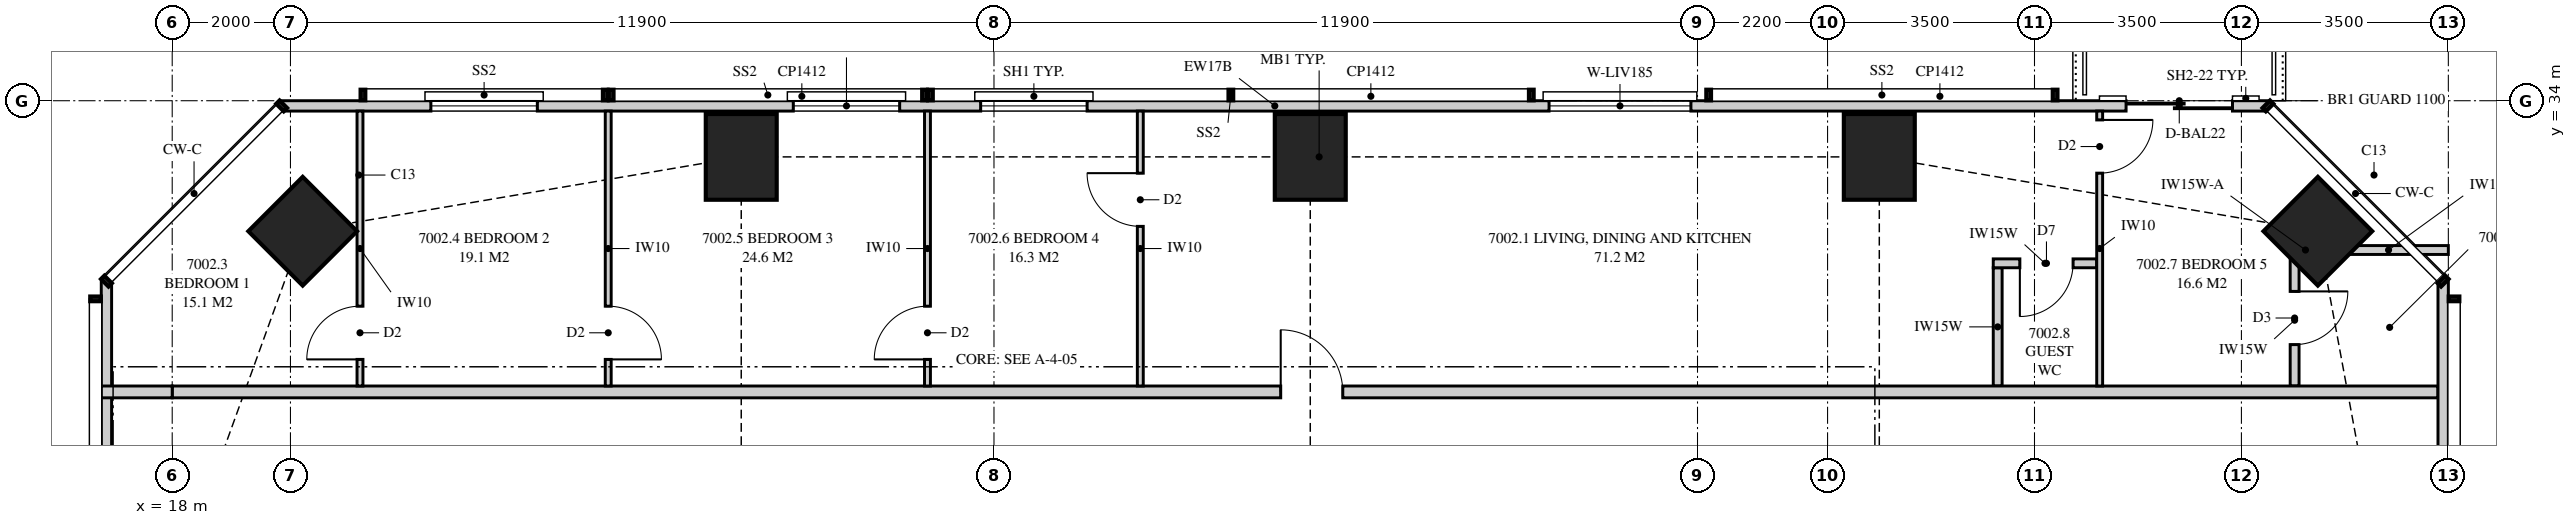
"""IFC4 building model, lengths in metres.
Left out: names, types, materials, properties, quantities, classifications, styles, units other than length and angle.
Written with IfcOpenShell. Run it as: python <this file> out.ifc"""

import sys

from ifc_helpers import new_model, si_unit, direction, frame, frame_2d, origin, origin_2d, place, context, subcontext, project, spatial, polyline, rectangle, outline, extrude, element, fill, save


model = new_model("IFC4")
c1 = context("Model", 3, precision=1e-05, world=origin(), true_north=direction((0.0, 1.0)))
c2 = subcontext(c1, "Body", "Model", "MODEL_VIEW")
j1 = project(units=[si_unit("LENGTHUNIT", "METRE"), si_unit("PLANEANGLEUNIT", "RADIAN")], contexts=[c1])
p1 = place(None, origin())
s1 = spatial("IfcSite", under=j1, at=p1, CompositionType="ELEMENT")
p2 = place(p1, origin())
s2 = spatial("IfcBuilding", under=s1, at=p2, CompositionType="ELEMENT")
p3 = place(p2, frame((0.0, 0.0, 256.45)))
s3 = spatial("IfcBuildingStorey", under=s2, at=p3, CompositionType="ELEMENT", Elevation=256.45)
p4 = place(p3, frame((54.293, 31.793, 0.0), z_axis=(0.0, 0.0, 1.0), x_axis=(0.707106781187, 0.707106781187, 0.0)))
e1 = element("IfcColumn", 1, at=p4, inside=s3, PredefinedType="COLUMN", context=c2, shape_type="SweptSolid", body=[
    extrude(rectangle(XDim=1.3, YDim=1.3, at=origin_2d()), origin(), (0.0, 0.0, 1.0), 3.5),
])
for number, where, z_axis, x_axis in (
    (2, (46.875, 33.05, 0.0), (0.0, 0.0, 1.0), (0.0, 1.0, 0.0)),
    (3, (37.25, 33.05, 0.0), (0.0, 0.0, 1.0), (0.0, 1.0, 0.0)),
    (4, (27.625, 33.05, 0.0), (0.0, 0.0, 1.0), (0.0, 1.0, 0.0)),
):
    element("IfcColumn", number, at=place(p3, frame(where, z_axis=z_axis, x_axis=x_axis)), inside=s3, PredefinedType="COLUMN", context=c2, shape_type="SweptSolid", body=[
        extrude(rectangle(XDim=1.45, YDim=1.2, at=origin_2d()), origin(), (0.0, 0.0, 1.0), 3.5),
    ])
p5 = place(p3, frame((20.207, 31.793, 0.0), z_axis=(0.0, 0.0, 1.0), x_axis=(0.707106781187, 0.707106781187, 0.0)))
e5 = element("IfcColumn", 5, at=p5, inside=s3, PredefinedType="COLUMN", context=c2, shape_type="SweptSolid", body=[
    extrude(rectangle(XDim=1.3, YDim=1.3, at=origin_2d()), origin(), (0.0, 0.0, 1.0), 3.5),
])
p6 = place(p3, frame((56.413, 3.051, 0.0), z_axis=(0.0, 0.0, 1.0), x_axis=(0.0, 1.0, 0.0)))
e6 = element("IfcWall", 6, at=p6, inside=s3, PredefinedType="SOLIDWALL", context=c2, shape_type="SweptSolid", body=[
    extrude(outline(polyline([(0.0, 0.0), (27.897, 0.0), (27.897, 3.26), (22.157, 3.26), (22.157, 2.3), (22.092, 2.3), (22.092, 3.26), (21.949, 3.26), (21.949, 2.3), (9.949, 2.3), (9.949, 3.26), (9.858, 3.26), (9.858, 2.3), (9.688, 2.3), (9.688, 3.26), (0.0, 3.26), (0.0, 0.0)])), frame((0.0, 0.087, 0.0), z_axis=(0.0, -1.0, 0.0), x_axis=(1.0, 0.0, 0.0)), (0.0, 0.0, 1.0), 0.175),
])
p7 = place(p6, frame((10.831, 0.0, 0.4)))
e7 = element("IfcOpeningElement", 7, at=p7, cuts=e6, PredefinedType="OPENING", context=c2, shape_type="SweptSolid", body=[
    extrude(rectangle(XDim=2.4, YDim=1.85, at=frame_2d((1.2, 0.925))), frame((0.0, 0.097, 0.0), z_axis=(0.0, -1.0, 0.0), x_axis=(1.0, 0.0, 0.0)), (0.0, 0.0, 1.0), 0.195),
])
p8 = place(p6, frame((15.074, 0.0, 0.0)))
e8 = element("IfcOpeningElement", 8, at=p8, cuts=e6, PredefinedType="OPENING", context=c2, shape_type="SweptSolid", body=[
    extrude(rectangle(XDim=1.8, YDim=2.25, at=frame_2d((0.9, 1.125))), frame((0.0, 0.097, 0.0), z_axis=(0.0, -1.0, 0.0), x_axis=(1.0, 0.0, 0.0)), (0.0, 0.0, 1.0), 0.195),
])
p9 = place(p6, frame((18.699, 0.0, 0.4)))
e9 = element("IfcOpeningElement", 9, at=p9, cuts=e6, PredefinedType="OPENING", context=c2, shape_type="SweptSolid", body=[
    extrude(rectangle(XDim=2.4, YDim=1.85, at=frame_2d((1.2, 0.925))), frame((0.0, 0.097, 0.0), z_axis=(0.0, -1.0, 0.0), x_axis=(1.0, 0.0, 0.0)), (0.0, 0.0, 1.0), 0.195),
])
p10 = place(p3, frame((53.449, 33.913, 0.0), z_axis=(0.0, 0.0, 1.0), x_axis=(-1.0, 0.0, 0.0)))
e10 = element("IfcWall", 10, at=p10, inside=s3, PredefinedType="SOLIDWALL", context=c2, shape_type="SweptSolid", body=[
    extrude(outline(polyline([(0.0, 0.0), (33.597, 0.0), (33.597, 3.26), (26.039, 3.26), (26.039, 2.3), (25.955, 2.3), (25.955, 3.26), (25.824, 3.26), (25.824, 2.3), (6.574, 2.3), (6.574, 3.26), (6.442, 3.26), (6.442, 2.3), (6.359, 2.3), (6.359, 3.26), (0.0, 3.26), (0.0, 0.0)])), frame((0.0, 0.087, 0.0), z_axis=(0.0, -1.0, 0.0), x_axis=(1.0, 0.0, 0.0)), (0.0, 0.0, 1.0), 0.175),
])
p11 = place(p10, frame((0.6, 0.0, 0.0)))
e11 = element("IfcOpeningElement", 11, at=p11, cuts=e10, PredefinedType="OPENING", context=c2, shape_type="SweptSolid", body=[
    extrude(rectangle(XDim=1.8, YDim=2.25, at=frame_2d((0.9, 1.125))), frame((0.0, 0.097, 0.0), z_axis=(0.0, -1.0, 0.0), x_axis=(1.0, 0.0, 0.0)), (0.0, 0.0, 1.0), 0.195),
])
p12 = place(p10, frame((9.76, 0.0, 0.4)))
e12 = element("IfcOpeningElement", 12, at=p12, cuts=e10, PredefinedType="OPENING", context=c2, shape_type="SweptSolid", body=[
    extrude(rectangle(XDim=2.4, YDim=1.85, at=frame_2d((1.2, 0.925))), frame((0.0, 0.097, 0.0), z_axis=(0.0, -1.0, 0.0), x_axis=(1.0, 0.0, 0.0)), (0.0, 0.0, 1.0), 0.195),
])
p13 = place(p10, frame((19.974, 0.0, 0.4)))
e13 = element("IfcOpeningElement", 13, at=p13, cuts=e10, PredefinedType="OPENING", context=c2, shape_type="SweptSolid", body=[
    extrude(rectangle(XDim=1.8, YDim=1.85, at=frame_2d((0.9, 0.925))), frame((0.0, 0.097, 0.0), z_axis=(0.0, -1.0, 0.0), x_axis=(1.0, 0.0, 0.0)), (0.0, 0.0, 1.0), 0.195),
])
p14 = place(p10, frame((23.144, 0.0, 0.4)))
e14 = element("IfcOpeningElement", 14, at=p14, cuts=e10, PredefinedType="OPENING", context=c2, shape_type="SweptSolid", body=[
    extrude(rectangle(XDim=1.8, YDim=1.85, at=frame_2d((0.9, 0.925))), frame((0.0, 0.097, 0.0), z_axis=(0.0, -1.0, 0.0), x_axis=(1.0, 0.0, 0.0)), (0.0, 0.0, 1.0), 0.195),
])
p15 = place(p10, frame((29.273, 0.0, 0.4)))
e15 = element("IfcOpeningElement", 15, at=p15, cuts=e10, PredefinedType="OPENING", context=c2, shape_type="SweptSolid", body=[
    extrude(rectangle(XDim=1.8, YDim=1.85, at=frame_2d((0.9, 0.925))), frame((0.0, 0.097, 0.0), z_axis=(0.0, -1.0, 0.0), x_axis=(1.0, 0.0, 0.0)), (0.0, 0.0, 1.0), 0.195),
])
p16 = place(p3, frame((16.887, 30.949, 0.0), z_axis=(0.0, 0.0, 1.0), x_axis=(0.0, -1.0, 0.0)))
e16 = element("IfcWall", 16, at=p16, inside=s3, PredefinedType="SOLIDWALL", context=c2, shape_type="SweptSolid", body=[
    extrude(outline(polyline([(0.0, 0.0), (27.897, 0.0), (27.897, 3.26), (18.148, 3.26), (18.148, 2.3), (18.125, 2.3), (18.125, 3.26), (17.949, 3.26), (17.949, 2.3), (5.949, 2.3), (5.949, 3.26), (0.0, 3.26), (0.0, 0.0)])), frame((0.0, 0.087, 0.0), z_axis=(0.0, -1.0, 0.0), x_axis=(1.0, 0.0, 0.0)), (0.0, 0.0, 1.0), 0.175),
])
p17 = place(p16, frame((11.849, 0.0, 0.4)))
e17 = element("IfcOpeningElement", 17, at=p17, cuts=e16, PredefinedType="OPENING", context=c2, shape_type="SweptSolid", body=[
    extrude(rectangle(XDim=1.2, YDim=1.85, at=frame_2d((0.6, 0.925))), frame((0.0, 0.097, 0.0), z_axis=(0.0, -1.0, 0.0), x_axis=(1.0, 0.0, 0.0)), (0.0, 0.0, 1.0), 0.195),
])
p18 = place(p3, frame((18.0, 29.075, 0.0), z_axis=(0.0, 0.0, 1.0), x_axis=(1.0, 0.0, 0.0)))
e18 = element("IfcWall", 18, at=p18, inside=s3, PredefinedType="PARTITIONING", context=c2, shape_type="SweptSolid", body=[
    extrude(outline(polyline([(0.0, 0.0), (38.325, 0.0), (38.325, 3.26), (37.721, 3.26), (37.721, 2.3), (35.87, 2.3), (35.87, 3.26), (30.185, 3.26), (30.185, 2.66), (27.565, 2.66), (27.565, 3.26), (20.56, 3.26), (20.56, 2.66), (17.94, 2.66), (17.94, 3.26), (10.935, 3.26), (10.935, 2.66), (8.315, 2.66), (8.315, 3.26), (2.192, 3.26), (2.192, 2.3), (0.256, 2.3), (0.256, 3.26), (0.0, 3.26), (0.0, 0.0)])), frame((0.0, 0.1, 0.0), z_axis=(0.0, -1.0, 0.0), x_axis=(1.0, 0.0, 0.0)), (0.0, 0.0, 1.0), 0.2),
])
p19 = place(p18, frame((18.75, 0.0, 0.0)))
e19 = element("IfcOpeningElement", 19, at=p19, cuts=e18, PredefinedType="OPENING", context=c2, shape_type="SweptSolid", body=[
    extrude(rectangle(XDim=1.05, YDim=2.2, at=frame_2d((0.525, 1.1))), frame((0.0, 0.11, 0.0), z_axis=(0.0, -1.0, 0.0), x_axis=(1.0, 0.0, 0.0)), (0.0, 0.0, 1.0), 0.22),
])
p20 = place(p3, frame((53.975, 31.475, 0.0), z_axis=(0.0, 0.0, 1.0), x_axis=(1.0, 0.0, 0.0)))
e20 = element("IfcWall", 20, at=p20, inside=s3, PredefinedType="PLUMBINGWALL", context=c2, shape_type="SweptSolid", body=[
    extrude(rectangle(XDim=0.217, YDim=0.15, at=frame_2d((0.108, 0.0))), origin(), (0.0, 0.0, 1.0), 2.3),
])
p21 = place(p3, frame((54.478, 31.475, 0.0), z_axis=(0.0, 0.0, 1.0), x_axis=(1.0, 0.0, 0.0)))
e21 = element("IfcWall", 21, at=p21, inside=s3, PredefinedType="PLUMBINGWALL", context=c2, shape_type="SweptSolid", body=[
    extrude(outline(polyline([(0.774, 3.26), (0.774, 2.3), (0.325, 2.3), (0.0, 1.15), (0.325, 0.0), (2.022, 0.0), (2.022, 3.26), (0.774, 3.26)])), frame((0.0, 0.075, 0.0), z_axis=(0.0, -1.0, 0.0), x_axis=(1.0, 0.0, 0.0)), (0.0, 0.0, 1.0), 0.15),
])
p22 = place(p3, frame((53.9, 31.4, 0.0), z_axis=(0.0, 0.0, 1.0), x_axis=(0.0, -1.0, 0.0)))
e22 = element("IfcWall", 22, at=p22, inside=s3, PredefinedType="PLUMBINGWALL", context=c2, shape_type="SweptSolid", body=[
    extrude(outline(polyline([(0.0, 0.0), (2.225, 0.0), (2.225, 3.26), (2.225, 2.3), (0.438, 2.3), (0.0, 2.3), (0.0, 3.26), (0.0, 0.0)])), frame((0.0, 0.075, 0.0), z_axis=(0.0, -1.0, 0.0), x_axis=(1.0, 0.0, 0.0)), (0.0, 0.0, 1.0), 0.15),
])
p23 = place(p22, frame((0.625, 0.0, 0.0)))
e23 = element("IfcOpeningElement", 23, at=p23, cuts=e22, PredefinedType="OPENING", context=c2, shape_type="SweptSolid", body=[
    extrude(rectangle(XDim=0.9, YDim=2.1, at=frame_2d((0.45, 1.05))), frame((0.0, 0.085, 0.0), z_axis=(0.0, -1.0, 0.0), x_axis=(1.0, 0.0, 0.0)), (0.0, 0.0, 1.0), 0.17),
])
p24 = place(p3, frame((21.176, 33.825, 0.0), z_axis=(0.0, 0.0, 1.0), x_axis=(0.0, -1.0, 0.0)))
e24 = element("IfcWall", 24, at=p24, inside=s3, PredefinedType="PARTITIONING", context=c2, shape_type="SweptSolid", body=[
    extrude(outline(polyline([(0.0, 0.0), (4.65, 0.0), (4.65, 3.26), (2.74, 3.26), (2.74, 2.3), (0.996, 2.3), (0.996, 3.26), (0.0, 3.26), (0.0, 0.0)])), frame((0.0, 0.05, 0.0), z_axis=(0.0, -1.0, 0.0), x_axis=(1.0, 0.0, 0.0)), (0.0, 0.0, 1.0), 0.1),
])
p25 = place(p24, frame((3.3, 0.0, 0.0)))
e25 = element("IfcOpeningElement", 25, at=p25, cuts=e24, PredefinedType="OPENING", context=c2, shape_type="SweptSolid", body=[
    extrude(rectangle(XDim=0.9, YDim=2.1, at=frame_2d((0.45, 1.05))), frame((0.0, 0.06, 0.0), z_axis=(0.0, -1.0, 0.0), x_axis=(1.0, 0.0, 0.0)), (0.0, 0.0, 1.0), 0.12),
])
p26 = place(p3, frame((25.375, 33.825, 0.0), z_axis=(0.0, 0.0, 1.0), x_axis=(0.0, -1.0, 0.0)))
e26 = element("IfcWall", 26, at=p26, inside=s3, PredefinedType="PARTITIONING", context=c2, shape_type="SweptSolid", body=[
    extrude(outline(polyline([(0.0, 0.0), (4.65, 0.0), (4.65, 3.26), (2.029, 3.26), (2.029, 2.3), (0.284, 2.3), (0.284, 3.26), (0.0, 3.26), (0.0, 0.0)])), frame((0.0, 0.05, 0.0), z_axis=(0.0, -1.0, 0.0), x_axis=(1.0, 0.0, 0.0)), (0.0, 0.0, 1.0), 0.1),
])
p27 = place(p26, frame((3.3, 0.0, 0.0)))
e27 = element("IfcOpeningElement", 27, at=p27, cuts=e26, PredefinedType="OPENING", context=c2, shape_type="SweptSolid", body=[
    extrude(rectangle(XDim=0.9, YDim=2.1, at=frame_2d((0.45, 1.05))), frame((0.0, 0.06, 0.0), z_axis=(0.0, -1.0, 0.0), x_axis=(1.0, 0.0, 0.0)), (0.0, 0.0, 1.0), 0.12),
])
p28 = place(p3, frame((30.775, 33.825, 0.0), z_axis=(0.0, 0.0, 1.0), x_axis=(0.0, -1.0, 0.0)))
e28 = element("IfcWall", 28, at=p28, inside=s3, PredefinedType="PARTITIONING", context=c2, shape_type="SweptSolid", body=[
    extrude(outline(polyline([(0.0, 0.0), (4.65, 0.0), (4.65, 3.26), (1.635, 3.26), (1.635, 2.3), (0.0, 2.3), (0.0, 3.26), (0.0, 0.0)])), frame((0.0, 0.05, 0.0), z_axis=(0.0, -1.0, 0.0), x_axis=(1.0, 0.0, 0.0)), (0.0, 0.0, 1.0), 0.1),
])
p29 = place(p28, frame((3.3, 0.0, 0.0)))
e29 = element("IfcOpeningElement", 29, at=p29, cuts=e28, PredefinedType="OPENING", context=c2, shape_type="SweptSolid", body=[
    extrude(rectangle(XDim=0.9, YDim=2.1, at=frame_2d((0.45, 1.05))), frame((0.0, 0.06, 0.0), z_axis=(0.0, -1.0, 0.0), x_axis=(1.0, 0.0, 0.0)), (0.0, 0.0, 1.0), 0.12),
])
p30 = place(p3, frame((34.375, 33.825, 0.0), z_axis=(0.0, 0.0, 1.0), x_axis=(0.0, -1.0, 0.0)))
e30 = element("IfcWall", 30, at=p30, inside=s3, PredefinedType="PARTITIONING", context=c2, shape_type="SweptSolid", body=[
    extrude(outline(polyline([(0.0, 0.0), (4.65, 0.0), (4.65, 3.26), (1.635, 3.26), (1.635, 2.3), (0.0, 2.3), (0.0, 3.26), (0.0, 0.0)])), frame((0.0, 0.05, 0.0), z_axis=(0.0, -1.0, 0.0), x_axis=(1.0, 0.0, 0.0)), (0.0, 0.0, 1.0), 0.1),
])
p31 = place(p30, frame((1.05, 0.0, 0.0)))
e31 = element("IfcOpeningElement", 31, at=p31, cuts=e30, PredefinedType="OPENING", context=c2, shape_type="SweptSolid", body=[
    extrude(rectangle(XDim=0.9, YDim=2.1, at=frame_2d((0.45, 1.05))), frame((0.0, 0.06, 0.0), z_axis=(0.0, -1.0, 0.0), x_axis=(1.0, 0.0, 0.0)), (0.0, 0.0, 1.0), 0.12),
])
p32 = place(p3, frame((50.603, 33.825, 0.0), z_axis=(0.0, 0.0, 1.0), x_axis=(0.0, -1.0, 0.0)))
e32 = element("IfcWall", 32, at=p32, inside=s3, PredefinedType="PARTITIONING", context=c2, shape_type="SweptSolid", body=[
    extrude(outline(polyline([(0.0, 0.0), (4.65, 0.0), (4.65, 3.26), (2.279, 3.26), (2.279, 2.3), (0.534, 2.3), (0.534, 3.26), (0.0, 3.26), (0.0, 0.0)])), frame((0.0, 0.05, 0.0), z_axis=(0.0, -1.0, 0.0), x_axis=(1.0, 0.0, 0.0)), (0.0, 0.0, 1.0), 0.1),
])
p33 = place(p32, frame((0.15, 0.0, 0.0)))
e33 = element("IfcOpeningElement", 33, at=p33, cuts=e32, PredefinedType="OPENING", context=c2, shape_type="SweptSolid", body=[
    extrude(rectangle(XDim=0.9, YDim=2.1, at=frame_2d((0.45, 1.05))), frame((0.0, 0.06, 0.0), z_axis=(0.0, -1.0, 0.0), x_axis=(1.0, 0.0, 0.0)), (0.0, 0.0, 1.0), 0.12),
])
p34 = place(p3, frame((16.8, 29.075, 0.0), z_axis=(0.0, 0.0, 1.0), x_axis=(1.0, 0.0, 0.0)))
e34 = element("IfcWall", 34, at=p34, inside=s3, PredefinedType="PARTITIONING", context=c2, shape_type="SweptSolid", body=[
    extrude(rectangle(XDim=1.2, YDim=0.2, at=frame_2d((0.6, 0.0))), origin(), (0.0, 0.0, 1.0), 3.26),
])
p35 = place(p3, frame((50.552, 31.25, 0.0), z_axis=(0.0, 0.0, 1.0), x_axis=(-1.0, 0.0, 0.0)))
e35 = element("IfcWall", 35, at=p35, inside=s3, PredefinedType="PLUMBINGWALL", context=c2, shape_type="SweptSolid", body=[
    extrude(rectangle(XDim=1.75, YDim=0.15, at=frame_2d((0.875, 0.0))), origin(), (0.0, 0.0, 1.0), 3.26),
])
p36 = place(p35, frame((0.4, 0.0, 0.0)))
e36 = element("IfcOpeningElement", 36, at=p36, cuts=e35, PredefinedType="OPENING", context=c2, shape_type="SweptSolid", body=[
    extrude(rectangle(XDim=0.9, YDim=2.1, at=frame_2d((0.45, 1.05))), frame((0.0, 0.085, 0.0), z_axis=(0.0, -1.0, 0.0), x_axis=(1.0, 0.0, 0.0)), (0.0, 0.0, 1.0), 0.17),
])
p37 = place(p3, frame((48.877, 29.175, 0.0), z_axis=(0.0, 0.0, 1.0), x_axis=(0.0, 1.0, 0.0)))
e37 = element("IfcWall", 37, at=p37, inside=s3, PredefinedType="PLUMBINGWALL", context=c2, shape_type="SweptSolid", body=[
    extrude(rectangle(XDim=2.0, YDim=0.15, at=frame_2d((1.0, 0.0))), origin(), (0.0, 0.0, 1.0), 3.26),
])
p38 = place(p11, origin())
e38 = element("IfcDoor", 38, at=p38, inside=s3, OperationType="SLIDING_TO_LEFT", PredefinedType="DOOR", context=c2, shape_type="SweptSolid", body=[
    extrude(rectangle(XDim=1.8, YDim=2.25, at=frame_2d((0.9, 1.125))), frame((0.0, 0.025, 0.0), z_axis=(0.0, -1.0, 0.0), x_axis=(1.0, 0.0, 0.0)), (0.0, 0.0, 1.0), 0.05),
])
fill(e11, e38)
p39 = place(p12, origin())
e39 = element("IfcWindow", 39, at=p39, inside=s3, PartitioningType="SINGLE_PANEL", PredefinedType="WINDOW", context=c2, shape_type="SweptSolid", body=[
    extrude(rectangle(XDim=2.4, YDim=1.85, at=frame_2d((1.2, 0.925))), frame((0.0, 0.03, 0.0), z_axis=(0.0, -1.0, 0.0), x_axis=(1.0, 0.0, 0.0)), (0.0, 0.0, 1.0), 0.06),
])
fill(e12, e39)
p40 = place(p13, origin())
e40 = element("IfcWindow", 40, at=p40, inside=s3, PartitioningType="SINGLE_PANEL", PredefinedType="WINDOW", context=c2, shape_type="SweptSolid", body=[
    extrude(rectangle(XDim=1.8, YDim=1.85, at=frame_2d((0.9, 0.925))), frame((0.0, 0.03, 0.0), z_axis=(0.0, -1.0, 0.0), x_axis=(1.0, 0.0, 0.0)), (0.0, 0.0, 1.0), 0.06),
])
fill(e13, e40)
p41 = place(p14, origin())
e41 = element("IfcWindow", 41, at=p41, inside=s3, PartitioningType="SINGLE_PANEL", PredefinedType="WINDOW", context=c2, shape_type="SweptSolid", body=[
    extrude(rectangle(XDim=1.8, YDim=1.85, at=frame_2d((0.9, 0.925))), frame((0.0, 0.03, 0.0), z_axis=(0.0, -1.0, 0.0), x_axis=(1.0, 0.0, 0.0)), (0.0, 0.0, 1.0), 0.06),
])
fill(e14, e41)
p42 = place(p15, origin())
e42 = element("IfcWindow", 42, at=p42, inside=s3, PartitioningType="SINGLE_PANEL", PredefinedType="WINDOW", context=c2, shape_type="SweptSolid", body=[
    extrude(rectangle(XDim=1.8, YDim=1.85, at=frame_2d((0.9, 0.925))), frame((0.0, 0.03, 0.0), z_axis=(0.0, -1.0, 0.0), x_axis=(1.0, 0.0, 0.0)), (0.0, 0.0, 1.0), 0.06),
])
fill(e15, e42)
p43 = place(p19, origin())
e43 = element("IfcDoor", 43, at=p43, inside=s3, OperationType="SINGLE_SWING_LEFT", PredefinedType="DOOR", context=c2, shape_type="SweptSolid", body=[
    extrude(rectangle(XDim=1.05, YDim=2.2, at=frame_2d((0.525, 1.1))), frame((0.0, 0.025, 0.0), z_axis=(0.0, -1.0, 0.0), x_axis=(1.0, 0.0, 0.0)), (0.0, 0.0, 1.0), 0.05),
])
fill(e19, e43)
p44 = place(p23, origin())
e44 = element("IfcDoor", 44, at=p44, inside=s3, OperationType="SINGLE_SWING_LEFT", PredefinedType="DOOR", context=c2, shape_type="SweptSolid", body=[
    extrude(rectangle(XDim=0.9, YDim=2.1, at=frame_2d((0.45, 1.05))), frame((0.0, 0.025, 0.0), z_axis=(0.0, -1.0, 0.0), x_axis=(1.0, 0.0, 0.0)), (0.0, 0.0, 1.0), 0.05),
])
fill(e23, e44)
p45 = place(p25, frame((0.9, 0.0, 0.0), z_axis=(0.0, 0.0, 1.0), x_axis=(-1.0, 0.0, 0.0)))
e45 = element("IfcDoor", 45, at=p45, inside=s3, OperationType="SINGLE_SWING_LEFT", PredefinedType="DOOR", context=c2, shape_type="SweptSolid", body=[
    extrude(rectangle(XDim=0.9, YDim=2.1, at=frame_2d((0.45, 1.05))), frame((0.0, 0.025, 0.0), z_axis=(0.0, -1.0, 0.0), x_axis=(1.0, 0.0, 0.0)), (0.0, 0.0, 1.0), 0.05),
])
fill(e25, e45)
p46 = place(p27, origin())
e46 = element("IfcDoor", 46, at=p46, inside=s3, OperationType="SINGLE_SWING_RIGHT", PredefinedType="DOOR", context=c2, shape_type="SweptSolid", body=[
    extrude(rectangle(XDim=0.9, YDim=2.1, at=frame_2d((0.45, 1.05))), frame((0.0, 0.025, 0.0), z_axis=(0.0, -1.0, 0.0), x_axis=(1.0, 0.0, 0.0)), (0.0, 0.0, 1.0), 0.05),
])
fill(e27, e46)
p47 = place(p29, frame((0.9, 0.0, 0.0), z_axis=(0.0, 0.0, 1.0), x_axis=(-1.0, 0.0, 0.0)))
e47 = element("IfcDoor", 47, at=p47, inside=s3, OperationType="SINGLE_SWING_LEFT", PredefinedType="DOOR", context=c2, shape_type="SweptSolid", body=[
    extrude(rectangle(XDim=0.9, YDim=2.1, at=frame_2d((0.45, 1.05))), frame((0.0, 0.025, 0.0), z_axis=(0.0, -1.0, 0.0), x_axis=(1.0, 0.0, 0.0)), (0.0, 0.0, 1.0), 0.05),
])
fill(e29, e47)
p48 = place(p31, frame((0.9, 0.0, 0.0), z_axis=(0.0, 0.0, 1.0), x_axis=(-1.0, 0.0, 0.0)))
e48 = element("IfcDoor", 48, at=p48, inside=s3, OperationType="SINGLE_SWING_RIGHT", PredefinedType="DOOR", context=c2, shape_type="SweptSolid", body=[
    extrude(rectangle(XDim=0.9, YDim=2.1, at=frame_2d((0.45, 1.05))), frame((0.0, 0.025, 0.0), z_axis=(0.0, -1.0, 0.0), x_axis=(1.0, 0.0, 0.0)), (0.0, 0.0, 1.0), 0.05),
])
fill(e31, e48)
p49 = place(p33, origin())
e49 = element("IfcDoor", 49, at=p49, inside=s3, OperationType="SINGLE_SWING_LEFT", PredefinedType="DOOR", context=c2, shape_type="SweptSolid", body=[
    extrude(rectangle(XDim=0.9, YDim=2.1, at=frame_2d((0.45, 1.05))), frame((0.0, 0.025, 0.0), z_axis=(0.0, -1.0, 0.0), x_axis=(1.0, 0.0, 0.0)), (0.0, 0.0, 1.0), 0.05),
])
fill(e33, e49)
p50 = place(p36, origin())
e50 = element("IfcDoor", 50, at=p50, inside=s3, OperationType="SINGLE_SWING_RIGHT", PredefinedType="DOOR", context=c2, shape_type="SweptSolid", body=[
    extrude(rectangle(XDim=0.9, YDim=2.1, at=frame_2d((0.45, 1.05))), frame((0.0, 0.025, 0.0), z_axis=(0.0, -1.0, 0.0), x_axis=(1.0, 0.0, 0.0)), (0.0, 0.0, 1.0), 0.05),
])
fill(e36, e50)
save(model, sys.argv[1])
